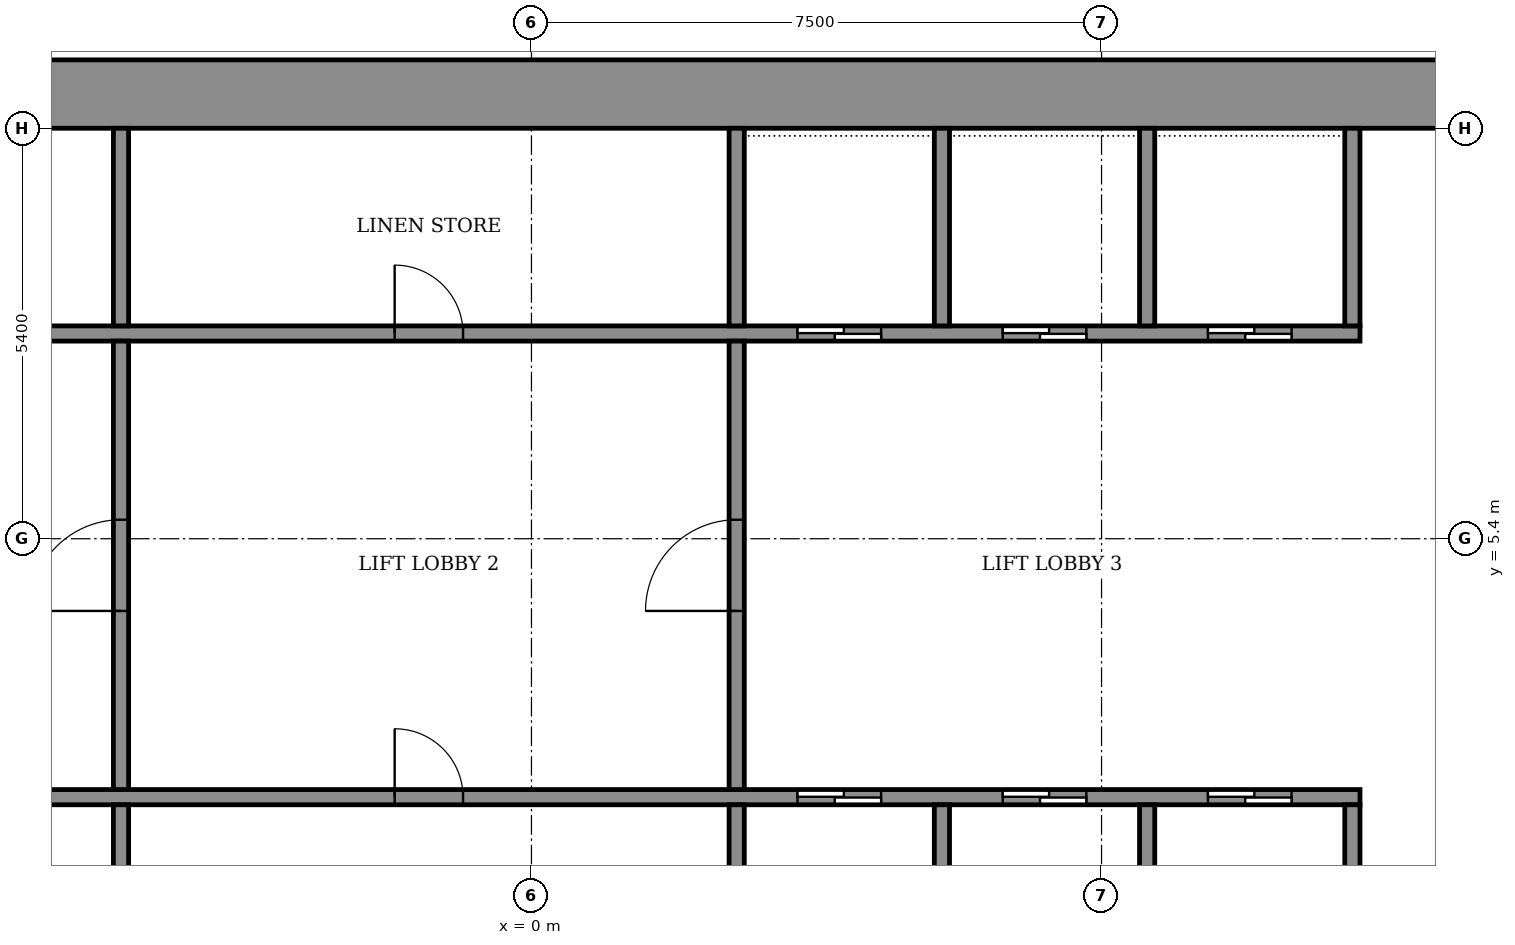
"""IFC4 building model, lengths in metres.
Left out: names, types, materials, properties, quantities, classifications, styles, units other than length and angle.
Written with IfcOpenShell. Run it as: python <this file> out.ifc"""

import sys

from ifc_helpers import new_model, si_unit, direction, frame, frame_2d, origin, place, context, subcontext, project, spatial, rectangle, extrude, element, fill, save


model = new_model("IFC4")
c1 = context("Model", 3, precision=1e-05, world=origin(), true_north=direction((0.0, 1.0)))
c2 = subcontext(c1, "Body", "Model", "MODEL_VIEW")
j1 = project(units=[si_unit("LENGTHUNIT", "METRE"), si_unit("PLANEANGLEUNIT", "RADIAN")], contexts=[c1])
p1 = place(None, origin())
s1 = spatial("IfcSite", under=j1, at=p1, CompositionType="ELEMENT")
p2 = place(p1, origin())
s2 = spatial("IfcBuilding", under=s1, at=p2, CompositionType="ELEMENT")
p3 = place(p2, frame((0.0, 0.0, 182.5)))
s3 = spatial("IfcBuildingStorey", under=s2, at=p3, CompositionType="ELEMENT", Elevation=182.5)
p4 = place(p3, frame((-14.7, 11.25, 0.0), z_axis=(0.0, 0.0, 1.0), x_axis=(1.0, 0.0, 0.0)))
e1 = element("IfcWall", 1, at=p4, inside=s3, PredefinedType="SHEAR", context=c2, shape_type="SweptSolid", body=[
    extrude(rectangle(XDim=29.4, YDim=0.9, at=frame_2d((14.7, 0.0))), origin(), (0.0, 0.0, 1.0), 3.6),
])
p5 = place(p3, frame((-10.9, 2.0, 0.0), z_axis=(0.0, 0.0, 1.0), x_axis=(1.0, 0.0, 0.0)))
e2 = element("IfcWall", 2, at=p5, inside=s3, PredefinedType="SHEAR", context=c2, shape_type="SweptSolid", body=[
    extrude(rectangle(XDim=21.8, YDim=0.2, at=frame_2d((10.9, 0.0))), origin(), (0.0, 0.0, 1.0), 3.05),
])
p6 = place(p5, frame((14.4, 0.0, 0.0)))
e3 = element("IfcOpeningElement", 3, at=p6, cuts=e2, PredefinedType="OPENING", context=c2, shape_type="SweptSolid", body=[
    extrude(rectangle(XDim=1.1, YDim=2.1, at=frame_2d((0.55, 1.05))), frame((0.0, 0.11, 0.0), z_axis=(0.0, -1.0, 0.0), x_axis=(1.0, 0.0, 0.0)), (0.0, 0.0, 1.0), 0.22),
])
p7 = place(p5, frame((17.1, 0.0, 0.0)))
e4 = element("IfcOpeningElement", 4, at=p7, cuts=e2, PredefinedType="OPENING", context=c2, shape_type="SweptSolid", body=[
    extrude(rectangle(XDim=1.1, YDim=2.1, at=frame_2d((0.55, 1.05))), frame((0.0, 0.11, 0.0), z_axis=(0.0, -1.0, 0.0), x_axis=(1.0, 0.0, 0.0)), (0.0, 0.0, 1.0), 0.22),
])
p8 = place(p5, frame((19.8, 0.0, 0.0)))
e5 = element("IfcOpeningElement", 5, at=p8, cuts=e2, PredefinedType="OPENING", context=c2, shape_type="SweptSolid", body=[
    extrude(rectangle(XDim=1.1, YDim=2.1, at=frame_2d((0.55, 1.05))), frame((0.0, 0.11, 0.0), z_axis=(0.0, -1.0, 0.0), x_axis=(1.0, 0.0, 0.0)), (0.0, 0.0, 1.0), 0.22),
])
p9 = place(p5, frame((2.35, 0.0, 0.0)))
e6 = element("IfcOpeningElement", 6, at=p9, cuts=e2, PredefinedType="OPENING", context=c2, shape_type="SweptSolid", body=[
    extrude(rectangle(XDim=0.9, YDim=2.1, at=frame_2d((0.45, 1.05))), frame((0.0, 0.11, 0.0), z_axis=(0.0, -1.0, 0.0), x_axis=(1.0, 0.0, 0.0)), (0.0, 0.0, 1.0), 0.22),
])
p10 = place(p5, frame((9.1, 0.0, 0.0)))
e7 = element("IfcOpeningElement", 7, at=p10, cuts=e2, PredefinedType="OPENING", context=c2, shape_type="SweptSolid", body=[
    extrude(rectangle(XDim=0.9, YDim=2.1, at=frame_2d((0.45, 1.05))), frame((0.0, 0.11, 0.0), z_axis=(0.0, -1.0, 0.0), x_axis=(1.0, 0.0, 0.0)), (0.0, 0.0, 1.0), 0.22),
])
p11 = place(p3, frame((-10.9, 8.1, 0.0), z_axis=(0.0, 0.0, 1.0), x_axis=(1.0, 0.0, 0.0)))
e8 = element("IfcWall", 8, at=p11, inside=s3, PredefinedType="SHEAR", context=c2, shape_type="SweptSolid", body=[
    extrude(rectangle(XDim=21.8, YDim=0.2, at=frame_2d((10.9, 0.0))), origin(), (0.0, 0.0, 1.0), 3.05),
])
p12 = place(p11, frame((14.4, 0.0, 0.0)))
e9 = element("IfcOpeningElement", 9, at=p12, cuts=e8, PredefinedType="OPENING", context=c2, shape_type="SweptSolid", body=[
    extrude(rectangle(XDim=1.1, YDim=2.1, at=frame_2d((0.55, 1.05))), frame((0.0, 0.11, 0.0), z_axis=(0.0, -1.0, 0.0), x_axis=(1.0, 0.0, 0.0)), (0.0, 0.0, 1.0), 0.22),
])
p13 = place(p11, frame((17.1, 0.0, 0.0)))
e10 = element("IfcOpeningElement", 10, at=p13, cuts=e8, PredefinedType="OPENING", context=c2, shape_type="SweptSolid", body=[
    extrude(rectangle(XDim=1.1, YDim=2.1, at=frame_2d((0.55, 1.05))), frame((0.0, 0.11, 0.0), z_axis=(0.0, -1.0, 0.0), x_axis=(1.0, 0.0, 0.0)), (0.0, 0.0, 1.0), 0.22),
])
p14 = place(p11, frame((19.8, 0.0, 0.0)))
e11 = element("IfcOpeningElement", 11, at=p14, cuts=e8, PredefinedType="OPENING", context=c2, shape_type="SweptSolid", body=[
    extrude(rectangle(XDim=1.1, YDim=2.1, at=frame_2d((0.55, 1.05))), frame((0.0, 0.11, 0.0), z_axis=(0.0, -1.0, 0.0), x_axis=(1.0, 0.0, 0.0)), (0.0, 0.0, 1.0), 0.22),
])
p15 = place(p11, frame((2.35, 0.0, 0.0)))
e12 = element("IfcOpeningElement", 12, at=p15, cuts=e8, PredefinedType="OPENING", context=c2, shape_type="SweptSolid", body=[
    extrude(rectangle(XDim=0.9, YDim=2.1, at=frame_2d((0.45, 1.05))), frame((0.0, 0.11, 0.0), z_axis=(0.0, -1.0, 0.0), x_axis=(1.0, 0.0, 0.0)), (0.0, 0.0, 1.0), 0.22),
])
p16 = place(p11, frame((9.1, 0.0, 0.0)))
e13 = element("IfcOpeningElement", 13, at=p16, cuts=e8, PredefinedType="OPENING", context=c2, shape_type="SweptSolid", body=[
    extrude(rectangle(XDim=0.9, YDim=2.1, at=frame_2d((0.45, 1.05))), frame((0.0, 0.11, 0.0), z_axis=(0.0, -1.0, 0.0), x_axis=(1.0, 0.0, 0.0)), (0.0, 0.0, 1.0), 0.22),
])
p17 = place(p3, frame((-5.4, -0.6, 0.0), z_axis=(0.0, 0.0, 1.0), x_axis=(0.0, 1.0, 0.0)))
e14 = element("IfcWall", 14, at=p17, inside=s3, PredefinedType="STANDARD", context=c2, shape_type="SweptSolid", body=[
    extrude(rectangle(XDim=2.5, YDim=0.2, at=frame_2d((1.25, 0.0))), origin(), (0.0, 0.0, 1.0), 3.05),
])
for number, where, z_axis, x_axis in (
    (15, (2.7, -0.6, 0.0), (0.0, 0.0, 1.0), (0.0, 1.0, 0.0)),
    (16, (5.4, -0.6, 0.0), (0.0, 0.0, 1.0), (0.0, 1.0, 0.0)),
    (17, (8.1, -0.6, 0.0), (0.0, 0.0, 1.0), (0.0, 1.0, 0.0)),
    (18, (10.8, -0.6, 0.0), (0.0, 0.0, 1.0), (0.0, 1.0, 0.0)),
):
    element("IfcWall", number, at=place(p3, frame(where, z_axis=z_axis, x_axis=x_axis)), inside=s3, PredefinedType="SHEAR", context=c2, shape_type="SweptSolid", body=[
        extrude(rectangle(XDim=2.5, YDim=0.2, at=frame_2d((1.25, 0.0))), origin(), (0.0, 0.0, 1.0), 3.05),
    ])
p18 = place(p3, frame((-5.4, 8.2, 0.0), z_axis=(0.0, 0.0, 1.0), x_axis=(0.0, 1.0, 0.0)))
e19 = element("IfcWall", 19, at=p18, inside=s3, PredefinedType="STANDARD", context=c2, shape_type="SweptSolid", body=[
    extrude(rectangle(XDim=2.6, YDim=0.2, at=frame_2d((1.3, 0.0))), origin(), (0.0, 0.0, 1.0), 3.05),
])
for number, where, z_axis, x_axis in (
    (20, (2.7, 8.2, 0.0), (0.0, 0.0, 1.0), (0.0, 1.0, 0.0)),
    (21, (5.4, 8.2, 0.0), (0.0, 0.0, 1.0), (0.0, 1.0, 0.0)),
    (22, (8.1, 8.2, 0.0), (0.0, 0.0, 1.0), (0.0, 1.0, 0.0)),
    (23, (10.8, 8.2, 0.0), (0.0, 0.0, 1.0), (0.0, 1.0, 0.0)),
):
    element("IfcWall", number, at=place(p3, frame(where, z_axis=z_axis, x_axis=x_axis)), inside=s3, PredefinedType="SHEAR", context=c2, shape_type="SweptSolid", body=[
        extrude(rectangle(XDim=2.6, YDim=0.2, at=frame_2d((1.3, 0.0))), origin(), (0.0, 0.0, 1.0), 3.05),
    ])
p19 = place(p3, frame((-5.4, 2.1, 0.0), z_axis=(0.0, 0.0, 1.0), x_axis=(0.0, 1.0, 0.0)))
e24 = element("IfcWall", 24, at=p19, inside=s3, PredefinedType="STANDARD", context=c2, shape_type="SweptSolid", body=[
    extrude(rectangle(XDim=5.9, YDim=0.2, at=frame_2d((2.95, 0.0))), origin(), (0.0, 0.0, 1.0), 3.05),
])
p20 = place(p19, frame((2.35, 0.0, 0.0)))
e25 = element("IfcOpeningElement", 25, at=p20, cuts=e24, PredefinedType="OPENING", context=c2, shape_type="SweptSolid", body=[
    extrude(rectangle(XDim=1.2, YDim=2.1, at=frame_2d((0.6, 1.05))), frame((0.0, 0.11, 0.0), z_axis=(0.0, -1.0, 0.0), x_axis=(1.0, 0.0, 0.0)), (0.0, 0.0, 1.0), 0.22),
])
p21 = place(p3, frame((2.7, 2.1, 0.0), z_axis=(0.0, 0.0, 1.0), x_axis=(0.0, 1.0, 0.0)))
e26 = element("IfcWall", 26, at=p21, inside=s3, PredefinedType="STANDARD", context=c2, shape_type="SweptSolid", body=[
    extrude(rectangle(XDim=5.9, YDim=0.2, at=frame_2d((2.95, 0.0))), origin(), (0.0, 0.0, 1.0), 3.05),
])
p22 = place(p21, frame((2.35, 0.0, 0.0)))
e27 = element("IfcOpeningElement", 27, at=p22, cuts=e26, PredefinedType="OPENING", context=c2, shape_type="SweptSolid", body=[
    extrude(rectangle(XDim=1.2, YDim=2.1, at=frame_2d((0.6, 1.05))), frame((0.0, 0.11, 0.0), z_axis=(0.0, -1.0, 0.0), x_axis=(1.0, 0.0, 0.0)), (0.0, 0.0, 1.0), 0.22),
])
p23 = place(p6, origin())
e28 = element("IfcDoor", 28, at=p23, inside=s3, OperationType="SLIDING_TO_LEFT", PredefinedType="DOOR", context=c2, shape_type="SweptSolid", body=[
    extrude(rectangle(XDim=1.1, YDim=2.1, at=frame_2d((0.55, 1.05))), frame((0.0, 0.025, 0.0), z_axis=(0.0, -1.0, 0.0), x_axis=(1.0, 0.0, 0.0)), (0.0, 0.0, 1.0), 0.05),
])
fill(e3, e28)
p24 = place(p7, origin())
e29 = element("IfcDoor", 29, at=p24, inside=s3, OperationType="SLIDING_TO_LEFT", PredefinedType="DOOR", context=c2, shape_type="SweptSolid", body=[
    extrude(rectangle(XDim=1.1, YDim=2.1, at=frame_2d((0.55, 1.05))), frame((0.0, 0.025, 0.0), z_axis=(0.0, -1.0, 0.0), x_axis=(1.0, 0.0, 0.0)), (0.0, 0.0, 1.0), 0.05),
])
fill(e4, e29)
p25 = place(p8, origin())
e30 = element("IfcDoor", 30, at=p25, inside=s3, OperationType="SLIDING_TO_LEFT", PredefinedType="DOOR", context=c2, shape_type="SweptSolid", body=[
    extrude(rectangle(XDim=1.1, YDim=2.1, at=frame_2d((0.55, 1.05))), frame((0.0, 0.025, 0.0), z_axis=(0.0, -1.0, 0.0), x_axis=(1.0, 0.0, 0.0)), (0.0, 0.0, 1.0), 0.05),
])
fill(e5, e30)
p26 = place(p12, origin())
e31 = element("IfcDoor", 31, at=p26, inside=s3, OperationType="SLIDING_TO_LEFT", PredefinedType="DOOR", context=c2, shape_type="SweptSolid", body=[
    extrude(rectangle(XDim=1.1, YDim=2.1, at=frame_2d((0.55, 1.05))), frame((0.0, 0.025, 0.0), z_axis=(0.0, -1.0, 0.0), x_axis=(1.0, 0.0, 0.0)), (0.0, 0.0, 1.0), 0.05),
])
fill(e9, e31)
p27 = place(p13, origin())
e32 = element("IfcDoor", 32, at=p27, inside=s3, OperationType="SLIDING_TO_LEFT", PredefinedType="DOOR", context=c2, shape_type="SweptSolid", body=[
    extrude(rectangle(XDim=1.1, YDim=2.1, at=frame_2d((0.55, 1.05))), frame((0.0, 0.025, 0.0), z_axis=(0.0, -1.0, 0.0), x_axis=(1.0, 0.0, 0.0)), (0.0, 0.0, 1.0), 0.05),
])
fill(e10, e32)
p28 = place(p14, origin())
e33 = element("IfcDoor", 33, at=p28, inside=s3, OperationType="SLIDING_TO_LEFT", PredefinedType="DOOR", context=c2, shape_type="SweptSolid", body=[
    extrude(rectangle(XDim=1.1, YDim=2.1, at=frame_2d((0.55, 1.05))), frame((0.0, 0.025, 0.0), z_axis=(0.0, -1.0, 0.0), x_axis=(1.0, 0.0, 0.0)), (0.0, 0.0, 1.0), 0.05),
])
fill(e11, e33)
p29 = place(p10, origin())
e34 = element("IfcDoor", 34, at=p29, inside=s3, OperationType="SINGLE_SWING_RIGHT", PredefinedType="DOOR", context=c2, shape_type="SweptSolid", body=[
    extrude(rectangle(XDim=0.9, YDim=2.1, at=frame_2d((0.45, 1.05))), frame((0.0, 0.025, 0.0), z_axis=(0.0, -1.0, 0.0), x_axis=(1.0, 0.0, 0.0)), (0.0, 0.0, 1.0), 0.05),
])
fill(e7, e34)
p30 = place(p16, origin())
e35 = element("IfcDoor", 35, at=p30, inside=s3, OperationType="SINGLE_SWING_RIGHT", PredefinedType="DOOR", context=c2, shape_type="SweptSolid", body=[
    extrude(rectangle(XDim=0.9, YDim=2.1, at=frame_2d((0.45, 1.05))), frame((0.0, 0.025, 0.0), z_axis=(0.0, -1.0, 0.0), x_axis=(1.0, 0.0, 0.0)), (0.0, 0.0, 1.0), 0.05),
])
fill(e13, e35)
p31 = place(p20, origin())
e36 = element("IfcDoor", 36, at=p31, inside=s3, OperationType="SINGLE_SWING_LEFT", PredefinedType="DOOR", context=c2, shape_type="SweptSolid", body=[
    extrude(rectangle(XDim=1.2, YDim=2.1, at=frame_2d((0.6, 1.05))), frame((0.0, 0.025, 0.0), z_axis=(0.0, -1.0, 0.0), x_axis=(1.0, 0.0, 0.0)), (0.0, 0.0, 1.0), 0.05),
])
fill(e25, e36)
p32 = place(p22, origin())
e37 = element("IfcDoor", 37, at=p32, inside=s3, OperationType="SINGLE_SWING_LEFT", PredefinedType="DOOR", context=c2, shape_type="SweptSolid", body=[
    extrude(rectangle(XDim=1.2, YDim=2.1, at=frame_2d((0.6, 1.05))), frame((0.0, 0.025, 0.0), z_axis=(0.0, -1.0, 0.0), x_axis=(1.0, 0.0, 0.0)), (0.0, 0.0, 1.0), 0.05),
])
fill(e27, e37)
save(model, sys.argv[1])
